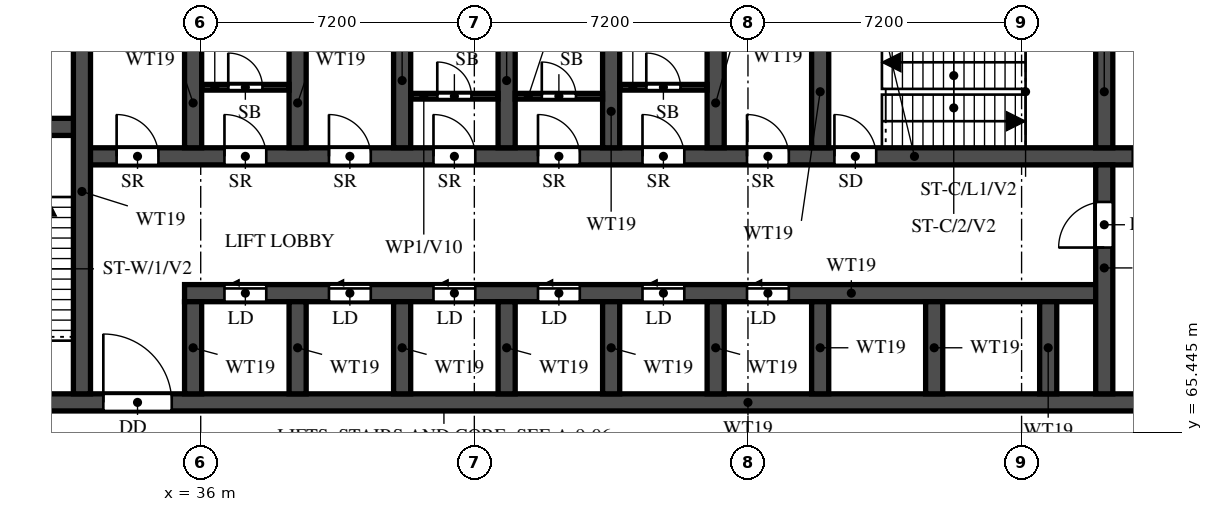
"""IFC4 building model, lengths in metres.
Left out: names, types, materials, properties, quantities, classifications, styles, units other than length and angle.
Written with IfcOpenShell. Run it as: python <this file> out.ifc"""

import sys

from ifc_helpers import new_model, si_unit, direction, frame, frame_2d, origin, place, context, subcontext, project, spatial, rectangle, extrude, element, fill, save


model = new_model("IFC4")
c1 = context("Model", 3, precision=1e-05, world=origin(), true_north=direction((0.0, 1.0)))
c2 = subcontext(c1, "Body", "Model", "MODEL_VIEW")
j1 = project(units=[si_unit("LENGTHUNIT", "METRE"), si_unit("PLANEANGLEUNIT", "RADIAN")], contexts=[c1])
p1 = place(None, origin())
s1 = spatial("IfcSite", under=j1, at=p1, CompositionType="ELEMENT")
p2 = place(p1, origin())
s2 = spatial("IfcBuilding", under=s1, at=p2, CompositionType="ELEMENT")
p3 = place(p2, frame((0.0, 0.0, 21.6)))
s3 = spatial("IfcBuildingStorey", under=s2, at=p3, CompositionType="ELEMENT", Elevation=21.6)
p4 = place(p3, frame((29.7, 66.225, 0.0), z_axis=(0.0, 0.0, 1.0), x_axis=(1.0, 0.0, 0.0)))
e1 = element("IfcWall", 1, at=p4, inside=s3, PredefinedType="SHEAR", context=c2, shape_type="SweptSolid", body=[
    extrude(rectangle(XDim=41.4, YDim=0.45, at=frame_2d((20.7, 0.0))), origin(), (0.0, 0.0, 1.0), 4.95),
])
p5 = place(p4, frame((0.925, 0.0, 0.0)))
e2 = element("IfcOpeningElement", 2, at=p5, cuts=e1, PredefinedType="OPENING", context=c2, shape_type="SweptSolid", body=[
    extrude(rectangle(XDim=1.1, YDim=2.1, at=frame_2d((0.55, 1.05))), frame((0.0, 0.235, 0.0), z_axis=(0.0, -1.0, 0.0), x_axis=(1.0, 0.0, 0.0)), (0.0, 0.0, 1.0), 0.47),
])
p6 = place(p4, frame((3.738, 0.0, 0.0)))
e3 = element("IfcOpeningElement", 3, at=p6, cuts=e1, PredefinedType="OPENING", context=c2, shape_type="SweptSolid", body=[
    extrude(rectangle(XDim=1.8, YDim=2.1, at=frame_2d((0.9, 1.05))), frame((0.0, 0.235, 0.0), z_axis=(0.0, -1.0, 0.0), x_axis=(1.0, 0.0, 0.0)), (0.0, 0.0, 1.0), 0.47),
])
p7 = place(p3, frame((35.575, 69.1, 0.0), z_axis=(0.0, 0.0, 1.0), x_axis=(1.0, 0.0, 0.0)))
e4 = element("IfcWall", 4, at=p7, inside=s3, PredefinedType="SHEAR", context=c2, shape_type="SweptSolid", body=[
    extrude(rectangle(XDim=24.2, YDim=0.45, at=frame_2d((12.1, 0.0))), origin(), (0.0, 0.0, 1.0), 4.95),
])
p8 = place(p7, frame((1.05, 0.0, 0.0)))
e5 = element("IfcOpeningElement", 5, at=p8, cuts=e4, PredefinedType="OPENING", context=c2, shape_type="SweptSolid", body=[
    extrude(rectangle(XDim=1.1, YDim=2.1, at=frame_2d((0.55, 1.05))), frame((0.0, 0.235, 0.0), z_axis=(0.0, -1.0, 0.0), x_axis=(1.0, 0.0, 0.0)), (0.0, 0.0, 1.0), 0.47),
])
p9 = place(p7, frame((3.8, 0.0, 0.0)))
e6 = element("IfcOpeningElement", 6, at=p9, cuts=e4, PredefinedType="OPENING", context=c2, shape_type="SweptSolid", body=[
    extrude(rectangle(XDim=1.1, YDim=2.1, at=frame_2d((0.55, 1.05))), frame((0.0, 0.235, 0.0), z_axis=(0.0, -1.0, 0.0), x_axis=(1.0, 0.0, 0.0)), (0.0, 0.0, 1.0), 0.47),
])
p10 = place(p7, frame((6.55, 0.0, 0.0)))
e7 = element("IfcOpeningElement", 7, at=p10, cuts=e4, PredefinedType="OPENING", context=c2, shape_type="SweptSolid", body=[
    extrude(rectangle(XDim=1.1, YDim=2.1, at=frame_2d((0.55, 1.05))), frame((0.0, 0.235, 0.0), z_axis=(0.0, -1.0, 0.0), x_axis=(1.0, 0.0, 0.0)), (0.0, 0.0, 1.0), 0.47),
])
p11 = place(p7, frame((9.3, 0.0, 0.0)))
e8 = element("IfcOpeningElement", 8, at=p11, cuts=e4, PredefinedType="OPENING", context=c2, shape_type="SweptSolid", body=[
    extrude(rectangle(XDim=1.1, YDim=2.1, at=frame_2d((0.55, 1.05))), frame((0.0, 0.235, 0.0), z_axis=(0.0, -1.0, 0.0), x_axis=(1.0, 0.0, 0.0)), (0.0, 0.0, 1.0), 0.47),
])
p12 = place(p7, frame((12.05, 0.0, 0.0)))
e9 = element("IfcOpeningElement", 9, at=p12, cuts=e4, PredefinedType="OPENING", context=c2, shape_type="SweptSolid", body=[
    extrude(rectangle(XDim=1.1, YDim=2.1, at=frame_2d((0.55, 1.05))), frame((0.0, 0.235, 0.0), z_axis=(0.0, -1.0, 0.0), x_axis=(1.0, 0.0, 0.0)), (0.0, 0.0, 1.0), 0.47),
])
p13 = place(p7, frame((14.8, 0.0, 0.0)))
e10 = element("IfcOpeningElement", 10, at=p13, cuts=e4, PredefinedType="OPENING", context=c2, shape_type="SweptSolid", body=[
    extrude(rectangle(XDim=1.1, YDim=2.1, at=frame_2d((0.55, 1.05))), frame((0.0, 0.235, 0.0), z_axis=(0.0, -1.0, 0.0), x_axis=(1.0, 0.0, 0.0)), (0.0, 0.0, 1.0), 0.47),
])
p14 = place(p3, frame((32.875, 72.7, 0.0), z_axis=(0.0, 0.0, 1.0), x_axis=(1.0, 0.0, 0.0)))
e11 = element("IfcWall", 11, at=p14, inside=s3, PredefinedType="SHEAR", context=c2, shape_type="SweptSolid", body=[
    extrude(rectangle(XDim=35.05, YDim=0.45, at=frame_2d((17.525, 0.0))), origin(), (0.0, 0.0, 1.0), 4.95),
])
p15 = place(p14, frame((19.8, 0.0, 0.0)))
e12 = element("IfcOpeningElement", 12, at=p15, cuts=e11, PredefinedType="OPENING", context=c2, shape_type="SweptSolid", body=[
    extrude(rectangle(XDim=1.1, YDim=2.1, at=frame_2d((0.55, 1.05))), frame((0.0, 0.235, 0.0), z_axis=(0.0, -1.0, 0.0), x_axis=(1.0, 0.0, 0.0)), (0.0, 0.0, 1.0), 0.47),
])
p16 = place(p14, frame((27.65, 0.0, 0.0)))
e13 = element("IfcOpeningElement", 13, at=p16, cuts=e11, PredefinedType="OPENING", context=c2, shape_type="SweptSolid", body=[
    extrude(rectangle(XDim=1.1, YDim=2.1, at=frame_2d((0.55, 1.05))), frame((0.0, 0.235, 0.0), z_axis=(0.0, -1.0, 0.0), x_axis=(1.0, 0.0, 0.0)), (0.0, 0.0, 1.0), 0.47),
])
p17 = place(p14, frame((30.25, 0.0, 0.0)))
e14 = element("IfcOpeningElement", 14, at=p17, cuts=e11, PredefinedType="OPENING", context=c2, shape_type="SweptSolid", body=[
    extrude(rectangle(XDim=1.1, YDim=2.1, at=frame_2d((0.55, 1.05))), frame((0.0, 0.235, 0.0), z_axis=(0.0, -1.0, 0.0), x_axis=(1.0, 0.0, 0.0)), (0.0, 0.0, 1.0), 0.47),
])
p18 = place(p14, frame((3.75, 0.0, 0.0)))
e15 = element("IfcOpeningElement", 15, at=p18, cuts=e11, PredefinedType="OPENING", context=c2, shape_type="SweptSolid", body=[
    extrude(rectangle(XDim=1.1, YDim=2.1, at=frame_2d((0.55, 1.05))), frame((0.0, 0.235, 0.0), z_axis=(0.0, -1.0, 0.0), x_axis=(1.0, 0.0, 0.0)), (0.0, 0.0, 1.0), 0.47),
])
p19 = place(p14, frame((6.5, 0.0, 0.0)))
e16 = element("IfcOpeningElement", 16, at=p19, cuts=e11, PredefinedType="OPENING", context=c2, shape_type="SweptSolid", body=[
    extrude(rectangle(XDim=1.1, YDim=2.1, at=frame_2d((0.55, 1.05))), frame((0.0, 0.235, 0.0), z_axis=(0.0, -1.0, 0.0), x_axis=(1.0, 0.0, 0.0)), (0.0, 0.0, 1.0), 0.47),
])
p20 = place(p14, frame((9.25, 0.0, 0.0)))
e17 = element("IfcOpeningElement", 17, at=p20, cuts=e11, PredefinedType="OPENING", context=c2, shape_type="SweptSolid", body=[
    extrude(rectangle(XDim=1.1, YDim=2.1, at=frame_2d((0.55, 1.05))), frame((0.0, 0.235, 0.0), z_axis=(0.0, -1.0, 0.0), x_axis=(1.0, 0.0, 0.0)), (0.0, 0.0, 1.0), 0.47),
])
p21 = place(p14, frame((12.0, 0.0, 0.0)))
e18 = element("IfcOpeningElement", 18, at=p21, cuts=e11, PredefinedType="OPENING", context=c2, shape_type="SweptSolid", body=[
    extrude(rectangle(XDim=1.1, YDim=2.1, at=frame_2d((0.55, 1.05))), frame((0.0, 0.235, 0.0), z_axis=(0.0, -1.0, 0.0), x_axis=(1.0, 0.0, 0.0)), (0.0, 0.0, 1.0), 0.47),
])
p22 = place(p14, frame((14.75, 0.0, 0.0)))
e19 = element("IfcOpeningElement", 19, at=p22, cuts=e11, PredefinedType="OPENING", context=c2, shape_type="SweptSolid", body=[
    extrude(rectangle(XDim=1.1, YDim=2.1, at=frame_2d((0.55, 1.05))), frame((0.0, 0.235, 0.0), z_axis=(0.0, -1.0, 0.0), x_axis=(1.0, 0.0, 0.0)), (0.0, 0.0, 1.0), 0.47),
])
p23 = place(p14, frame((17.5, 0.0, 0.0)))
e20 = element("IfcOpeningElement", 20, at=p23, cuts=e11, PredefinedType="OPENING", context=c2, shape_type="SweptSolid", body=[
    extrude(rectangle(XDim=1.1, YDim=2.1, at=frame_2d((0.55, 1.05))), frame((0.0, 0.235, 0.0), z_axis=(0.0, -1.0, 0.0), x_axis=(1.0, 0.0, 0.0)), (0.0, 0.0, 1.0), 0.47),
])
p24 = place(p14, frame((0.913, 0.0, 0.0)))
e21 = element("IfcOpeningElement", 21, at=p24, cuts=e11, PredefinedType="OPENING", context=c2, shape_type="SweptSolid", body=[
    extrude(rectangle(XDim=1.1, YDim=2.1, at=frame_2d((0.55, 1.05))), frame((0.0, 0.235, 0.0), z_axis=(0.0, -1.0, 0.0), x_axis=(1.0, 0.0, 0.0)), (0.0, 0.0, 1.0), 0.47),
])
p25 = place(p3, frame((29.7, 73.475, 0.0), z_axis=(0.0, 0.0, 1.0), x_axis=(1.0, 0.0, 0.0)))
e22 = element("IfcWall", 22, at=p25, inside=s3, PredefinedType="SHEAR", context=c2, shape_type="SweptSolid", body=[
    extrude(rectangle(XDim=3.175, YDim=0.45, at=frame_2d((1.587, 0.0))), origin(), (0.0, 0.0, 1.0), 4.95),
])
p26 = place(p3, frame((32.875, 66.45, 0.0), z_axis=(0.0, 0.0, 1.0), x_axis=(0.0, 1.0, 0.0)))
e23 = element("IfcWall", 23, at=p26, inside=s3, PredefinedType="SHEAR", context=c2, shape_type="SweptSolid", body=[
    extrude(rectangle(XDim=10.65, YDim=0.45, at=frame_2d((5.325, 0.0))), origin(), (0.0, 0.0, 1.0), 4.95),
])
p27 = place(p3, frame((59.775, 66.45, 0.0), z_axis=(0.0, 0.0, 1.0), x_axis=(0.0, 1.0, 0.0)))
e24 = element("IfcWall", 24, at=p27, inside=s3, PredefinedType="SHEAR", context=c2, shape_type="SweptSolid", body=[
    extrude(rectangle(XDim=6.025, YDim=0.45, at=frame_2d((3.013, 0.0))), origin(), (0.0, 0.0, 1.0), 4.95),
])
p28 = place(p27, frame((3.85, 0.0, 0.0)))
e25 = element("IfcOpeningElement", 25, at=p28, cuts=e24, PredefinedType="OPENING", context=c2, shape_type="SweptSolid", body=[
    extrude(rectangle(XDim=1.2, YDim=2.1, at=frame_2d((0.6, 1.05))), frame((0.0, 0.235, 0.0), z_axis=(0.0, -1.0, 0.0), x_axis=(1.0, 0.0, 0.0)), (0.0, 0.0, 1.0), 0.47),
])
p29 = place(p3, frame((59.775, 72.925, 0.0), z_axis=(0.0, 0.0, 1.0), x_axis=(0.0, 1.0, 0.0)))
e26 = element("IfcWall", 26, at=p29, inside=s3, PredefinedType="SHEAR", context=c2, shape_type="SweptSolid", body=[
    extrude(rectangle(XDim=2.95, YDim=0.45, at=frame_2d((1.475, 0.0))), origin(), (0.0, 0.0, 1.0), 4.95),
])
for number, where, z_axis, x_axis in (
    (27, (35.8, 66.45, 0.0), (0.0, 0.0, 1.0), (0.0, 1.0, 0.0)),
    (28, (38.55, 66.45, 0.0), (0.0, 0.0, 1.0), (0.0, 1.0, 0.0)),
    (29, (41.3, 66.45, 0.0), (0.0, 0.0, 1.0), (0.0, 1.0, 0.0)),
    (30, (44.05, 66.45, 0.0), (0.0, 0.0, 1.0), (0.0, 1.0, 0.0)),
    (31, (46.8, 66.45, 0.0), (0.0, 0.0, 1.0), (0.0, 1.0, 0.0)),
    (32, (49.55, 66.45, 0.0), (0.0, 0.0, 1.0), (0.0, 1.0, 0.0)),
    (33, (52.3, 66.45, 0.0), (0.0, 0.0, 1.0), (0.0, 1.0, 0.0)),
    (34, (55.3, 66.45, 0.0), (0.0, 0.0, 1.0), (0.0, 1.0, 0.0)),
    (35, (58.3, 66.45, 0.0), (0.0, 0.0, 1.0), (0.0, 1.0, 0.0)),
):
    element("IfcWall", number, at=place(p3, frame(where, z_axis=z_axis, x_axis=x_axis)), inside=s3, PredefinedType="SHEAR", context=c2, shape_type="SweptSolid", body=[
        extrude(rectangle(XDim=2.425, YDim=0.45, at=frame_2d((1.212, 0.0))), origin(), (0.0, 0.0, 1.0), 4.95),
    ])
for number, where, z_axis, x_axis in (
    (36, (35.8, 72.925, 0.0), (0.0, 0.0, 1.0), (0.0, 1.0, 0.0)),
    (37, (38.55, 72.925, 0.0), (0.0, 0.0, 1.0), (0.0, 1.0, 0.0)),
    (38, (41.3, 72.925, 0.0), (0.0, 0.0, 1.0), (0.0, 1.0, 0.0)),
    (39, (44.05, 72.925, 0.0), (0.0, 0.0, 1.0), (0.0, 1.0, 0.0)),
    (40, (46.8, 72.925, 0.0), (0.0, 0.0, 1.0), (0.0, 1.0, 0.0)),
    (41, (49.55, 72.925, 0.0), (0.0, 0.0, 1.0), (0.0, 1.0, 0.0)),
    (42, (52.3, 72.925, 0.0), (0.0, 0.0, 1.0), (0.0, 1.0, 0.0)),
):
    element("IfcWall", number, at=place(p3, frame(where, z_axis=z_axis, x_axis=x_axis)), inside=s3, PredefinedType="SHEAR", context=c2, shape_type="SweptSolid", body=[
        extrude(rectangle(XDim=2.95, YDim=0.45, at=frame_2d((1.475, 0.0))), origin(), (0.0, 0.0, 1.0), 4.95),
    ])
p30 = place(p3, frame((36.025, 74.518, 0.0), z_axis=(0.0, 0.0, 1.0), x_axis=(1.0, 0.0, 0.0)))
e43 = element("IfcWall", 43, at=p30, inside=s3, PredefinedType="PARTITIONING", context=c2, shape_type="SweptSolid", body=[
    extrude(rectangle(XDim=2.3, YDim=0.15, at=frame_2d((1.15, 0.0))), origin(), (0.0, 0.0, 1.0), 4.95),
])
p31 = place(p30, frame((0.7, 0.0, 0.0)))
e44 = element("IfcOpeningElement", 44, at=p31, cuts=e43, PredefinedType="OPENING", context=c2, shape_type="SweptSolid", body=[
    extrude(rectangle(XDim=0.9, YDim=2.1, at=frame_2d((0.45, 1.05))), frame((0.0, 0.085, 0.0), z_axis=(0.0, -1.0, 0.0), x_axis=(1.0, 0.0, 0.0)), (0.0, 0.0, 1.0), 0.17),
])
p32 = place(p3, frame((41.525, 74.282, 0.0), z_axis=(0.0, 0.0, 1.0), x_axis=(1.0, 0.0, 0.0)))
e45 = element("IfcWall", 45, at=p32, inside=s3, PredefinedType="PARTITIONING", context=c2, shape_type="SweptSolid", body=[
    extrude(rectangle(XDim=2.3, YDim=0.15, at=frame_2d((1.15, 0.0))), origin(), (0.0, 0.0, 1.0), 4.95),
])
p33 = place(p32, frame((0.7, 0.0, 0.0)))
e46 = element("IfcOpeningElement", 46, at=p33, cuts=e45, PredefinedType="OPENING", context=c2, shape_type="SweptSolid", body=[
    extrude(rectangle(XDim=0.9, YDim=2.1, at=frame_2d((0.45, 1.05))), frame((0.0, 0.085, 0.0), z_axis=(0.0, -1.0, 0.0), x_axis=(1.0, 0.0, 0.0)), (0.0, 0.0, 1.0), 0.17),
])
p34 = place(p3, frame((44.275, 74.282, 0.0), z_axis=(0.0, 0.0, 1.0), x_axis=(1.0, 0.0, 0.0)))
e47 = element("IfcWall", 47, at=p34, inside=s3, PredefinedType="PARTITIONING", context=c2, shape_type="SweptSolid", body=[
    extrude(rectangle(XDim=2.3, YDim=0.15, at=frame_2d((1.15, 0.0))), origin(), (0.0, 0.0, 1.0), 4.95),
])
p35 = place(p34, frame((0.7, 0.0, 0.0)))
e48 = element("IfcOpeningElement", 48, at=p35, cuts=e47, PredefinedType="OPENING", context=c2, shape_type="SweptSolid", body=[
    extrude(rectangle(XDim=0.9, YDim=2.1, at=frame_2d((0.45, 1.05))), frame((0.0, 0.085, 0.0), z_axis=(0.0, -1.0, 0.0), x_axis=(1.0, 0.0, 0.0)), (0.0, 0.0, 1.0), 0.17),
])
p36 = place(p3, frame((47.025, 74.518, 0.0), z_axis=(0.0, 0.0, 1.0), x_axis=(1.0, 0.0, 0.0)))
e49 = element("IfcWall", 49, at=p36, inside=s3, PredefinedType="PARTITIONING", context=c2, shape_type="SweptSolid", body=[
    extrude(rectangle(XDim=2.3, YDim=0.15, at=frame_2d((1.15, 0.0))), origin(), (0.0, 0.0, 1.0), 4.95),
])
p37 = place(p36, frame((0.7, 0.0, 0.0)))
e50 = element("IfcOpeningElement", 50, at=p37, cuts=e49, PredefinedType="OPENING", context=c2, shape_type="SweptSolid", body=[
    extrude(rectangle(XDim=0.9, YDim=2.1, at=frame_2d((0.45, 1.05))), frame((0.0, 0.085, 0.0), z_axis=(0.0, -1.0, 0.0), x_axis=(1.0, 0.0, 0.0)), (0.0, 0.0, 1.0), 0.17),
])
p38 = place(p15, origin())
e51 = element("IfcDoor", 51, at=p38, inside=s3, OperationType="SINGLE_SWING_LEFT", PredefinedType="DOOR", context=c2, shape_type="SweptSolid", body=[
    extrude(rectangle(XDim=1.1, YDim=2.1, at=frame_2d((0.55, 1.05))), frame((0.0, 0.025, 0.0), z_axis=(0.0, -1.0, 0.0), x_axis=(1.0, 0.0, 0.0)), (0.0, 0.0, 1.0), 0.05),
])
fill(e12, e51)
p39 = place(p6, origin())
e52 = element("IfcDoor", 52, at=p39, inside=s3, OperationType="DOUBLE_DOOR_SINGLE_SWING", PredefinedType="DOOR", context=c2, shape_type="SweptSolid", body=[
    extrude(rectangle(XDim=1.8, YDim=2.1, at=frame_2d((0.9, 1.05))), frame((0.0, 0.025, 0.0), z_axis=(0.0, -1.0, 0.0), x_axis=(1.0, 0.0, 0.0)), (0.0, 0.0, 1.0), 0.05),
])
fill(e3, e52)
p40 = place(p28, origin())
e53 = element("IfcDoor", 53, at=p40, inside=s3, OperationType="SINGLE_SWING_RIGHT", PredefinedType="DOOR", context=c2, shape_type="SweptSolid", body=[
    extrude(rectangle(XDim=1.2, YDim=2.1, at=frame_2d((0.6, 1.05))), frame((0.0, 0.025, 0.0), z_axis=(0.0, -1.0, 0.0), x_axis=(1.0, 0.0, 0.0)), (0.0, 0.0, 1.0), 0.05),
])
fill(e25, e53)
p41 = place(p16, origin())
e54 = element("IfcDoor", 54, at=p41, inside=s3, OperationType="SLIDING_TO_LEFT", PredefinedType="DOOR", context=c2, shape_type="SweptSolid", body=[
    extrude(rectangle(XDim=1.1, YDim=2.1, at=frame_2d((0.55, 1.05))), frame((0.0, 0.025, 0.0), z_axis=(0.0, -1.0, 0.0), x_axis=(1.0, 0.0, 0.0)), (0.0, 0.0, 1.0), 0.05),
])
fill(e13, e54)
p42 = place(p8, origin())
e55 = element("IfcDoor", 55, at=p42, inside=s3, OperationType="SLIDING_TO_LEFT", PredefinedType="DOOR", context=c2, shape_type="SweptSolid", body=[
    extrude(rectangle(XDim=1.1, YDim=2.1, at=frame_2d((0.55, 1.05))), frame((0.0, 0.025, 0.0), z_axis=(0.0, -1.0, 0.0), x_axis=(1.0, 0.0, 0.0)), (0.0, 0.0, 1.0), 0.05),
])
fill(e5, e55)
p43 = place(p9, origin())
e56 = element("IfcDoor", 56, at=p43, inside=s3, OperationType="SLIDING_TO_LEFT", PredefinedType="DOOR", context=c2, shape_type="SweptSolid", body=[
    extrude(rectangle(XDim=1.1, YDim=2.1, at=frame_2d((0.55, 1.05))), frame((0.0, 0.025, 0.0), z_axis=(0.0, -1.0, 0.0), x_axis=(1.0, 0.0, 0.0)), (0.0, 0.0, 1.0), 0.05),
])
fill(e6, e56)
p44 = place(p10, origin())
e57 = element("IfcDoor", 57, at=p44, inside=s3, OperationType="SLIDING_TO_LEFT", PredefinedType="DOOR", context=c2, shape_type="SweptSolid", body=[
    extrude(rectangle(XDim=1.1, YDim=2.1, at=frame_2d((0.55, 1.05))), frame((0.0, 0.025, 0.0), z_axis=(0.0, -1.0, 0.0), x_axis=(1.0, 0.0, 0.0)), (0.0, 0.0, 1.0), 0.05),
])
fill(e7, e57)
p45 = place(p11, origin())
e58 = element("IfcDoor", 58, at=p45, inside=s3, OperationType="SLIDING_TO_LEFT", PredefinedType="DOOR", context=c2, shape_type="SweptSolid", body=[
    extrude(rectangle(XDim=1.1, YDim=2.1, at=frame_2d((0.55, 1.05))), frame((0.0, 0.025, 0.0), z_axis=(0.0, -1.0, 0.0), x_axis=(1.0, 0.0, 0.0)), (0.0, 0.0, 1.0), 0.05),
])
fill(e8, e58)
p46 = place(p12, origin())
e59 = element("IfcDoor", 59, at=p46, inside=s3, OperationType="SLIDING_TO_LEFT", PredefinedType="DOOR", context=c2, shape_type="SweptSolid", body=[
    extrude(rectangle(XDim=1.1, YDim=2.1, at=frame_2d((0.55, 1.05))), frame((0.0, 0.025, 0.0), z_axis=(0.0, -1.0, 0.0), x_axis=(1.0, 0.0, 0.0)), (0.0, 0.0, 1.0), 0.05),
])
fill(e9, e59)
p47 = place(p13, origin())
e60 = element("IfcDoor", 60, at=p47, inside=s3, OperationType="SLIDING_TO_LEFT", PredefinedType="DOOR", context=c2, shape_type="SweptSolid", body=[
    extrude(rectangle(XDim=1.1, YDim=2.1, at=frame_2d((0.55, 1.05))), frame((0.0, 0.025, 0.0), z_axis=(0.0, -1.0, 0.0), x_axis=(1.0, 0.0, 0.0)), (0.0, 0.0, 1.0), 0.05),
])
fill(e10, e60)
p48 = place(p18, origin())
e61 = element("IfcDoor", 61, at=p48, inside=s3, OperationType="SINGLE_SWING_LEFT", PredefinedType="DOOR", context=c2, shape_type="SweptSolid", body=[
    extrude(rectangle(XDim=1.1, YDim=2.1, at=frame_2d((0.55, 1.05))), frame((0.0, 0.025, 0.0), z_axis=(0.0, -1.0, 0.0), x_axis=(1.0, 0.0, 0.0)), (0.0, 0.0, 1.0), 0.05),
])
fill(e15, e61)
p49 = place(p31, origin())
e62 = element("IfcDoor", 62, at=p49, inside=s3, OperationType="SINGLE_SWING_RIGHT", PredefinedType="DOOR", context=c2, shape_type="SweptSolid", body=[
    extrude(rectangle(XDim=0.9, YDim=2.1, at=frame_2d((0.45, 1.05))), frame((0.0, 0.025, 0.0), z_axis=(0.0, -1.0, 0.0), x_axis=(1.0, 0.0, 0.0)), (0.0, 0.0, 1.0), 0.05),
])
fill(e44, e62)
p50 = place(p19, origin())
e63 = element("IfcDoor", 63, at=p50, inside=s3, OperationType="SINGLE_SWING_LEFT", PredefinedType="DOOR", context=c2, shape_type="SweptSolid", body=[
    extrude(rectangle(XDim=1.1, YDim=2.1, at=frame_2d((0.55, 1.05))), frame((0.0, 0.025, 0.0), z_axis=(0.0, -1.0, 0.0), x_axis=(1.0, 0.0, 0.0)), (0.0, 0.0, 1.0), 0.05),
])
fill(e16, e63)
p51 = place(p20, origin())
e64 = element("IfcDoor", 64, at=p51, inside=s3, OperationType="SINGLE_SWING_LEFT", PredefinedType="DOOR", context=c2, shape_type="SweptSolid", body=[
    extrude(rectangle(XDim=1.1, YDim=2.1, at=frame_2d((0.55, 1.05))), frame((0.0, 0.025, 0.0), z_axis=(0.0, -1.0, 0.0), x_axis=(1.0, 0.0, 0.0)), (0.0, 0.0, 1.0), 0.05),
])
fill(e17, e64)
p52 = place(p33, origin())
e65 = element("IfcDoor", 65, at=p52, inside=s3, OperationType="SINGLE_SWING_LEFT", PredefinedType="DOOR", context=c2, shape_type="SweptSolid", body=[
    extrude(rectangle(XDim=0.9, YDim=2.1, at=frame_2d((0.45, 1.05))), frame((0.0, 0.025, 0.0), z_axis=(0.0, -1.0, 0.0), x_axis=(1.0, 0.0, 0.0)), (0.0, 0.0, 1.0), 0.05),
])
fill(e46, e65)
p53 = place(p21, origin())
e66 = element("IfcDoor", 66, at=p53, inside=s3, OperationType="SINGLE_SWING_LEFT", PredefinedType="DOOR", context=c2, shape_type="SweptSolid", body=[
    extrude(rectangle(XDim=1.1, YDim=2.1, at=frame_2d((0.55, 1.05))), frame((0.0, 0.025, 0.0), z_axis=(0.0, -1.0, 0.0), x_axis=(1.0, 0.0, 0.0)), (0.0, 0.0, 1.0), 0.05),
])
fill(e18, e66)
p54 = place(p35, origin())
e67 = element("IfcDoor", 67, at=p54, inside=s3, OperationType="SINGLE_SWING_RIGHT", PredefinedType="DOOR", context=c2, shape_type="SweptSolid", body=[
    extrude(rectangle(XDim=0.9, YDim=2.1, at=frame_2d((0.45, 1.05))), frame((0.0, 0.025, 0.0), z_axis=(0.0, -1.0, 0.0), x_axis=(1.0, 0.0, 0.0)), (0.0, 0.0, 1.0), 0.05),
])
fill(e48, e67)
p55 = place(p22, origin())
e68 = element("IfcDoor", 68, at=p55, inside=s3, OperationType="SINGLE_SWING_LEFT", PredefinedType="DOOR", context=c2, shape_type="SweptSolid", body=[
    extrude(rectangle(XDim=1.1, YDim=2.1, at=frame_2d((0.55, 1.05))), frame((0.0, 0.025, 0.0), z_axis=(0.0, -1.0, 0.0), x_axis=(1.0, 0.0, 0.0)), (0.0, 0.0, 1.0), 0.05),
])
fill(e19, e68)
p56 = place(p37, origin())
e69 = element("IfcDoor", 69, at=p56, inside=s3, OperationType="SINGLE_SWING_RIGHT", PredefinedType="DOOR", context=c2, shape_type="SweptSolid", body=[
    extrude(rectangle(XDim=0.9, YDim=2.1, at=frame_2d((0.45, 1.05))), frame((0.0, 0.025, 0.0), z_axis=(0.0, -1.0, 0.0), x_axis=(1.0, 0.0, 0.0)), (0.0, 0.0, 1.0), 0.05),
])
fill(e50, e69)
p57 = place(p23, origin())
e70 = element("IfcDoor", 70, at=p57, inside=s3, OperationType="SINGLE_SWING_LEFT", PredefinedType="DOOR", context=c2, shape_type="SweptSolid", body=[
    extrude(rectangle(XDim=1.1, YDim=2.1, at=frame_2d((0.55, 1.05))), frame((0.0, 0.025, 0.0), z_axis=(0.0, -1.0, 0.0), x_axis=(1.0, 0.0, 0.0)), (0.0, 0.0, 1.0), 0.05),
])
fill(e20, e70)
p58 = place(p24, origin())
e71 = element("IfcDoor", 71, at=p58, inside=s3, OperationType="SINGLE_SWING_LEFT", PredefinedType="DOOR", context=c2, shape_type="SweptSolid", body=[
    extrude(rectangle(XDim=1.1, YDim=2.1, at=frame_2d((0.55, 1.05))), frame((0.0, 0.025, 0.0), z_axis=(0.0, -1.0, 0.0), x_axis=(1.0, 0.0, 0.0)), (0.0, 0.0, 1.0), 0.05),
])
fill(e21, e71)
save(model, sys.argv[1])
